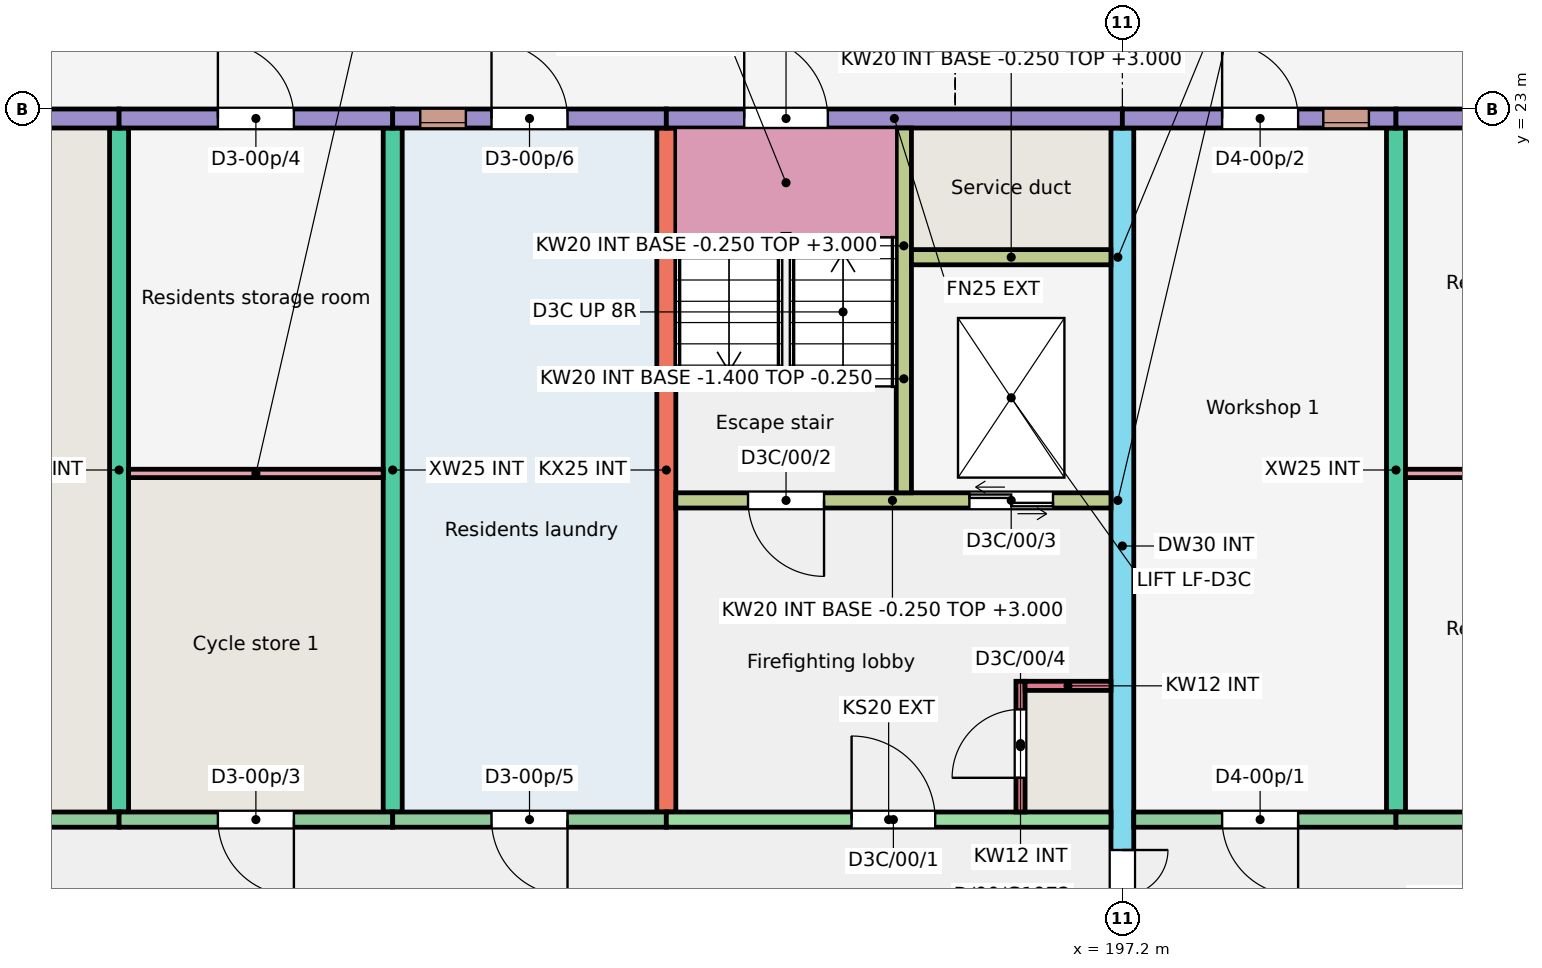
"""IFC4 building model, lengths in metres.
Left out: names, types, materials, properties, quantities, classifications, styles, units other than length and angle.
Written with IfcOpenShell. Run it as: python <this file> out.ifc"""

import sys

from ifc_helpers import new_model, si_unit, direction, frame, frame_2d, origin, place, context, subcontext, project, spatial, rectangle, extrude, element, fill, save


model = new_model("IFC4")
c1 = context("Model", 3, precision=1e-05, world=origin(), true_north=direction((0.0, 1.0)))
c2 = subcontext(c1, "Body", "Model", "MODEL_VIEW")
j1 = project(units=[si_unit("LENGTHUNIT", "METRE"), si_unit("PLANEANGLEUNIT", "RADIAN")], contexts=[c1])
p1 = place(None, origin())
s1 = spatial("IfcSite", under=j1, at=p1, CompositionType="ELEMENT")
p2 = place(p1, origin())
s2 = spatial("IfcBuilding", under=s1, at=p2, CompositionType="ELEMENT")
p3 = place(p2, origin())
s3 = spatial("IfcBuildingStorey", under=s2, at=p3, CompositionType="ELEMENT", Elevation=0.0)
for number, where, z_axis, x_axis in (
    (1, (184.0, 13.75, -0.25), (0.0, 0.0, 1.0), (0.0, 1.0, 0.0)),
    (2, (187.6, 13.75, -0.25), (0.0, 0.0, 1.0), (0.0, 1.0, 0.0)),
    (3, (191.2, 13.75, -0.25), (0.0, 0.0, 1.0), (0.0, 1.0, 0.0)),
):
    element("IfcWall", number, at=place(p3, frame(where, z_axis=z_axis, x_axis=x_axis)), inside=s3, PredefinedType="SHEAR", context=c2, shape_type="SweptSolid", body=[
        extrude(rectangle(XDim=9.0, YDim=0.25, at=frame_2d((4.5, 0.0))), origin(), (0.0, 0.0, 1.0), 3.25),
    ])
p4 = place(p3, frame((197.2, 11.75, -0.25), z_axis=(0.0, 0.0, 1.0), x_axis=(0.0, 1.0, 0.0)))
e4 = element("IfcWall", 4, at=p4, inside=s3, PredefinedType="SHEAR", context=c2, shape_type="SweptSolid", body=[
    extrude(rectangle(XDim=11.0, YDim=0.3, at=frame_2d((5.5, 0.0))), origin(), (0.0, 0.0, 1.0), 3.25),
])
p5 = place(p4, frame((0.3, 0.0, 0.25)))
e5 = element("IfcOpeningElement", 5, at=p5, cuts=e4, PredefinedType="OPENING", context=c2, shape_type="SweptSolid", body=[
    extrude(rectangle(XDim=1.2, YDim=2.1, at=frame_2d((0.6, 1.05))), frame((0.0, 0.16, 0.0), z_axis=(0.0, -1.0, 0.0), x_axis=(1.0, 0.0, 0.0)), (0.0, 0.0, 1.0), 0.32),
])
p6 = place(p3, frame((200.8, 13.75, -0.25), z_axis=(0.0, 0.0, 1.0), x_axis=(0.0, 1.0, 0.0)))
e6 = element("IfcWall", 6, at=p6, inside=s3, PredefinedType="SHEAR", context=c2, shape_type="SweptSolid", body=[
    extrude(rectangle(XDim=9.0, YDim=0.25, at=frame_2d((4.5, 0.0))), origin(), (0.0, 0.0, 1.0), 3.25),
])
p7 = place(p3, frame((180.4, 22.875, -0.25), z_axis=(0.0, 0.0, 1.0), x_axis=(1.0, 0.0, 0.0)))
e7 = element("IfcWall", 7, at=p7, inside=s3, PredefinedType="SOLIDWALL", context=c2, shape_type="SweptSolid", body=[
    extrude(rectangle(XDim=3.6, YDim=0.25, at=frame_2d((1.8, 0.0))), origin(), (0.0, 0.0, 1.0), 3.25),
])
p8 = place(p7, frame((1.312, 0.0, 0.25)))
e8 = element("IfcOpeningElement", 8, at=p8, cuts=e7, PredefinedType="OPENING", context=c2, shape_type="SweptSolid", body=[
    extrude(rectangle(XDim=1.0, YDim=2.1, at=frame_2d((0.5, 1.05))), frame((0.0, 0.135, 0.0), z_axis=(0.0, -1.0, 0.0), x_axis=(1.0, 0.0, 0.0)), (0.0, 0.0, 1.0), 0.27),
])
p9 = place(p3, frame((180.55, 13.65, -0.25), z_axis=(0.0, 0.0, 1.0), x_axis=(1.0, 0.0, 0.0)))
e9 = element("IfcWall", 9, at=p9, inside=s3, PredefinedType="SOLIDWALL", context=c2, shape_type="SweptSolid", body=[
    extrude(rectangle(XDim=3.45, YDim=0.2, at=frame_2d((1.725, 0.0))), origin(), (0.0, 0.0, 1.0), 3.25),
])
p10 = place(p9, frame((1.163, 0.0, 0.25)))
e10 = element("IfcOpeningElement", 10, at=p10, cuts=e9, PredefinedType="OPENING", context=c2, shape_type="SweptSolid", body=[
    extrude(rectangle(XDim=1.0, YDim=2.1, at=frame_2d((0.5, 1.05))), frame((0.0, 0.11, 0.0), z_axis=(0.0, -1.0, 0.0), x_axis=(1.0, 0.0, 0.0)), (0.0, 0.0, 1.0), 0.22),
])
p11 = place(p3, frame((184.0, 22.875, -0.25), z_axis=(0.0, 0.0, 1.0), x_axis=(1.0, 0.0, 0.0)))
e11 = element("IfcWall", 11, at=p11, inside=s3, PredefinedType="SOLIDWALL", context=c2, shape_type="SweptSolid", body=[
    extrude(rectangle(XDim=3.6, YDim=0.25, at=frame_2d((1.8, 0.0))), origin(), (0.0, 0.0, 1.0), 3.25),
])
p12 = place(p11, frame((1.3, 0.0, 0.25)))
e12 = element("IfcOpeningElement", 12, at=p12, cuts=e11, PredefinedType="OPENING", context=c2, shape_type="SweptSolid", body=[
    extrude(rectangle(XDim=1.0, YDim=2.1, at=frame_2d((0.5, 1.05))), frame((0.0, 0.135, 0.0), z_axis=(0.0, -1.0, 0.0), x_axis=(1.0, 0.0, 0.0)), (0.0, 0.0, 1.0), 0.27),
])
p13 = place(p3, frame((184.0, 13.65, -0.25), z_axis=(0.0, 0.0, 1.0), x_axis=(1.0, 0.0, 0.0)))
e13 = element("IfcWall", 13, at=p13, inside=s3, PredefinedType="SOLIDWALL", context=c2, shape_type="SweptSolid", body=[
    extrude(rectangle(XDim=3.6, YDim=0.2, at=frame_2d((1.8, 0.0))), origin(), (0.0, 0.0, 1.0), 3.25),
])
p14 = place(p13, frame((1.3, 0.0, 0.25)))
e14 = element("IfcOpeningElement", 14, at=p14, cuts=e13, PredefinedType="OPENING", context=c2, shape_type="SweptSolid", body=[
    extrude(rectangle(XDim=1.0, YDim=2.1, at=frame_2d((0.5, 1.05))), frame((0.0, 0.11, 0.0), z_axis=(0.0, -1.0, 0.0), x_axis=(1.0, 0.0, 0.0)), (0.0, 0.0, 1.0), 0.22),
])
p15 = place(p3, frame((187.6, 22.875, -0.25), z_axis=(0.0, 0.0, 1.0), x_axis=(1.0, 0.0, 0.0)))
e15 = element("IfcWall", 15, at=p15, inside=s3, PredefinedType="SOLIDWALL", context=c2, shape_type="SweptSolid", body=[
    extrude(rectangle(XDim=3.6, YDim=0.25, at=frame_2d((1.8, 0.0))), origin(), (0.0, 0.0, 1.0), 3.25),
])
p16 = place(p15, frame((0.363, 0.0, 2.05)))
e16 = element("IfcOpeningElement", 16, at=p16, cuts=e15, PredefinedType="OPENING", context=c2, shape_type="SweptSolid", body=[
    extrude(rectangle(XDim=0.6, YDim=0.6, at=frame_2d((0.3, 0.3))), frame((0.0, 0.135, 0.0), z_axis=(0.0, -1.0, 0.0), x_axis=(1.0, 0.0, 0.0)), (0.0, 0.0, 1.0), 0.27),
])
p17 = place(p15, frame((1.3, 0.0, 0.25)))
e17 = element("IfcOpeningElement", 17, at=p17, cuts=e15, PredefinedType="OPENING", context=c2, shape_type="SweptSolid", body=[
    extrude(rectangle(XDim=1.0, YDim=2.1, at=frame_2d((0.5, 1.05))), frame((0.0, 0.135, 0.0), z_axis=(0.0, -1.0, 0.0), x_axis=(1.0, 0.0, 0.0)), (0.0, 0.0, 1.0), 0.27),
])
p18 = place(p3, frame((187.6, 13.65, -0.25), z_axis=(0.0, 0.0, 1.0), x_axis=(1.0, 0.0, 0.0)))
e18 = element("IfcWall", 18, at=p18, inside=s3, PredefinedType="SOLIDWALL", context=c2, shape_type="SweptSolid", body=[
    extrude(rectangle(XDim=3.6, YDim=0.2, at=frame_2d((1.8, 0.0))), origin(), (0.0, 0.0, 1.0), 3.25),
])
p19 = place(p18, frame((1.3, 0.0, 0.25)))
e19 = element("IfcOpeningElement", 19, at=p19, cuts=e18, PredefinedType="OPENING", context=c2, shape_type="SweptSolid", body=[
    extrude(rectangle(XDim=1.0, YDim=2.1, at=frame_2d((0.5, 1.05))), frame((0.0, 0.11, 0.0), z_axis=(0.0, -1.0, 0.0), x_axis=(1.0, 0.0, 0.0)), (0.0, 0.0, 1.0), 0.22),
])
p20 = place(p3, frame((191.2, 22.875, -0.25), z_axis=(0.0, 0.0, 1.0), x_axis=(1.0, 0.0, 0.0)))
e20 = element("IfcWall", 20, at=p20, inside=s3, PredefinedType="SOLIDWALL", context=c2, shape_type="SweptSolid", body=[
    extrude(rectangle(XDim=6.0, YDim=0.25, at=frame_2d((3.0, 0.0))), origin(), (0.0, 0.0, 1.0), 3.25),
])
p21 = place(p20, frame((1.025, 0.0, 0.25)))
e21 = element("IfcOpeningElement", 21, at=p21, cuts=e20, PredefinedType="OPENING", context=c2, shape_type="SweptSolid", body=[
    extrude(rectangle(XDim=1.1, YDim=2.1, at=frame_2d((0.55, 1.05))), frame((0.0, 0.135, 0.0), z_axis=(0.0, -1.0, 0.0), x_axis=(1.0, 0.0, 0.0)), (0.0, 0.0, 1.0), 0.27),
])
p22 = place(p3, frame((191.2, 13.65, -0.25), z_axis=(0.0, 0.0, 1.0), x_axis=(1.0, 0.0, 0.0)))
e22 = element("IfcWall", 22, at=p22, inside=s3, PredefinedType="SHEAR", context=c2, shape_type="SweptSolid", body=[
    extrude(rectangle(XDim=5.85, YDim=0.2, at=frame_2d((2.925, 0.0))), origin(), (0.0, 0.0, 1.0), 3.25),
])
p23 = place(p22, frame((2.438, 0.0, 0.25)))
e23 = element("IfcOpeningElement", 23, at=p23, cuts=e22, PredefinedType="OPENING", context=c2, shape_type="SweptSolid", body=[
    extrude(rectangle(XDim=1.1, YDim=2.1, at=frame_2d((0.55, 1.05))), frame((0.0, 0.11, 0.0), z_axis=(0.0, -1.0, 0.0), x_axis=(1.0, 0.0, 0.0)), (0.0, 0.0, 1.0), 0.22),
])
p24 = place(p3, frame((191.325, 17.85, -0.25), z_axis=(0.0, 0.0, 1.0), x_axis=(1.0, 0.0, 0.0)))
e24 = element("IfcWall", 24, at=p24, inside=s3, PredefinedType="SHEAR", context=c2, shape_type="SweptSolid", body=[
    extrude(rectangle(XDim=5.725, YDim=0.2, at=frame_2d((2.863, 0.0))), origin(), (0.0, 0.0, 1.0), 3.25),
])
p25 = place(p24, frame((0.95, 0.0, 0.25)))
e25 = element("IfcOpeningElement", 25, at=p25, cuts=e24, PredefinedType="OPENING", context=c2, shape_type="SweptSolid", body=[
    extrude(rectangle(XDim=1.0, YDim=2.1, at=frame_2d((0.5, 1.05))), frame((0.0, 0.11, 0.0), z_axis=(0.0, -1.0, 0.0), x_axis=(1.0, 0.0, 0.0)), (0.0, 0.0, 1.0), 0.22),
])
p26 = place(p24, frame((3.863, 0.0, 0.25)))
e26 = element("IfcOpeningElement", 26, at=p26, cuts=e24, PredefinedType="OPENING", context=c2, shape_type="SweptSolid", body=[
    extrude(rectangle(XDim=1.1, YDim=2.1, at=frame_2d((0.55, 1.05))), frame((0.0, 0.11, 0.0), z_axis=(0.0, -1.0, 0.0), x_axis=(1.0, 0.0, 0.0)), (0.0, 0.0, 1.0), 0.22),
])
p27 = place(p3, frame((194.325, 17.95, -0.25), z_axis=(0.0, 0.0, 1.0), x_axis=(0.0, 1.0, 0.0)))
e27 = element("IfcWall", 27, at=p27, inside=s3, PredefinedType="SHEAR", context=c2, shape_type="SweptSolid", body=[
    extrude(rectangle(XDim=4.8, YDim=0.2, at=frame_2d((2.4, 0.0))), origin(), (0.0, 0.0, 1.0), 3.25),
])
p28 = place(p3, frame((194.425, 21.05, -0.25), z_axis=(0.0, 0.0, 1.0), x_axis=(1.0, 0.0, 0.0)))
e28 = element("IfcWall", 28, at=p28, inside=s3, PredefinedType="SHEAR", context=c2, shape_type="SweptSolid", body=[
    extrude(rectangle(XDim=2.625, YDim=0.2, at=frame_2d((1.312, 0.0))), origin(), (0.0, 0.0, 1.0), 3.25),
])
p29 = place(p3, frame((195.86, 13.75, -0.25), z_axis=(0.0, 0.0, 1.0), x_axis=(0.0, 1.0, 0.0)))
e29 = element("IfcWall", 29, at=p29, inside=s3, PredefinedType="SHEAR", context=c2, shape_type="SweptSolid", body=[
    extrude(rectangle(XDim=1.72, YDim=0.12, at=frame_2d((0.86, 0.0))), origin(), (0.0, 0.0, 1.0), 3.25),
])
p30 = place(p29, frame((0.45, 0.0, 0.25)))
e30 = element("IfcOpeningElement", 30, at=p30, cuts=e29, PredefinedType="OPENING", context=c2, shape_type="SweptSolid", body=[
    extrude(rectangle(XDim=0.9, YDim=2.1, at=frame_2d((0.45, 1.05))), frame((0.0, 0.07, 0.0), z_axis=(0.0, -1.0, 0.0), x_axis=(1.0, 0.0, 0.0)), (0.0, 0.0, 1.0), 0.14),
])
p31 = place(p3, frame((195.92, 15.41, -0.25), z_axis=(0.0, 0.0, 1.0), x_axis=(1.0, 0.0, 0.0)))
e31 = element("IfcWall", 31, at=p31, inside=s3, PredefinedType="SHEAR", context=c2, shape_type="SweptSolid", body=[
    extrude(rectangle(XDim=1.13, YDim=0.12, at=frame_2d((0.565, 0.0))), origin(), (0.0, 0.0, 1.0), 3.25),
])
p32 = place(p3, frame((197.2, 22.875, -0.25), z_axis=(0.0, 0.0, 1.0), x_axis=(1.0, 0.0, 0.0)))
e32 = element("IfcWall", 32, at=p32, inside=s3, PredefinedType="SOLIDWALL", context=c2, shape_type="SweptSolid", body=[
    extrude(rectangle(XDim=3.6, YDim=0.25, at=frame_2d((1.8, 0.0))), origin(), (0.0, 0.0, 1.0), 3.25),
])
p33 = place(p32, frame((2.644, 0.0, 2.05)))
e33 = element("IfcOpeningElement", 33, at=p33, cuts=e32, PredefinedType="OPENING", context=c2, shape_type="SweptSolid", body=[
    extrude(rectangle(XDim=0.6, YDim=0.6, at=frame_2d((0.3, 0.3))), frame((0.0, 0.135, 0.0), z_axis=(0.0, -1.0, 0.0), x_axis=(1.0, 0.0, 0.0)), (0.0, 0.0, 1.0), 0.27),
])
p34 = place(p32, frame((1.312, 0.0, 0.25)))
e34 = element("IfcOpeningElement", 34, at=p34, cuts=e32, PredefinedType="OPENING", context=c2, shape_type="SweptSolid", body=[
    extrude(rectangle(XDim=1.0, YDim=2.1, at=frame_2d((0.5, 1.05))), frame((0.0, 0.135, 0.0), z_axis=(0.0, -1.0, 0.0), x_axis=(1.0, 0.0, 0.0)), (0.0, 0.0, 1.0), 0.27),
])
p35 = place(p3, frame((197.35, 13.65, -0.25), z_axis=(0.0, 0.0, 1.0), x_axis=(1.0, 0.0, 0.0)))
e35 = element("IfcWall", 35, at=p35, inside=s3, PredefinedType="SOLIDWALL", context=c2, shape_type="SweptSolid", body=[
    extrude(rectangle(XDim=3.45, YDim=0.2, at=frame_2d((1.725, 0.0))), origin(), (0.0, 0.0, 1.0), 3.25),
])
p36 = place(p35, frame((1.163, 0.0, 0.25)))
e36 = element("IfcOpeningElement", 36, at=p36, cuts=e35, PredefinedType="OPENING", context=c2, shape_type="SweptSolid", body=[
    extrude(rectangle(XDim=1.0, YDim=2.1, at=frame_2d((0.5, 1.05))), frame((0.0, 0.11, 0.0), z_axis=(0.0, -1.0, 0.0), x_axis=(1.0, 0.0, 0.0)), (0.0, 0.0, 1.0), 0.22),
])
p37 = place(p3, frame((200.8, 22.875, -0.25), z_axis=(0.0, 0.0, 1.0), x_axis=(1.0, 0.0, 0.0)))
e37 = element("IfcWall", 37, at=p37, inside=s3, PredefinedType="SOLIDWALL", context=c2, shape_type="SweptSolid", body=[
    extrude(rectangle(XDim=3.6, YDim=0.25, at=frame_2d((1.8, 0.0))), origin(), (0.0, 0.0, 1.0), 3.25),
])
p38 = place(p37, frame((1.3, 0.0, 0.25)))
e38 = element("IfcOpeningElement", 38, at=p38, cuts=e37, PredefinedType="OPENING", context=c2, shape_type="SweptSolid", body=[
    extrude(rectangle(XDim=1.0, YDim=2.1, at=frame_2d((0.5, 1.05))), frame((0.0, 0.135, 0.0), z_axis=(0.0, -1.0, 0.0), x_axis=(1.0, 0.0, 0.0)), (0.0, 0.0, 1.0), 0.27),
])
p39 = place(p3, frame((200.8, 13.65, -0.25), z_axis=(0.0, 0.0, 1.0), x_axis=(1.0, 0.0, 0.0)))
e39 = element("IfcWall", 39, at=p39, inside=s3, PredefinedType="SOLIDWALL", context=c2, shape_type="SweptSolid", body=[
    extrude(rectangle(XDim=3.6, YDim=0.2, at=frame_2d((1.8, 0.0))), origin(), (0.0, 0.0, 1.0), 3.25),
])
p40 = place(p39, frame((1.3, 0.0, 0.25)))
e40 = element("IfcOpeningElement", 40, at=p40, cuts=e39, PredefinedType="OPENING", context=c2, shape_type="SweptSolid", body=[
    extrude(rectangle(XDim=1.0, YDim=2.1, at=frame_2d((0.5, 1.05))), frame((0.0, 0.11, 0.0), z_axis=(0.0, -1.0, 0.0), x_axis=(1.0, 0.0, 0.0)), (0.0, 0.0, 1.0), 0.22),
])
for number, where, z_axis, x_axis in (
    (41, (194.225, 17.85, -1.4), (0.0, 0.0, 1.0), (1.0, 0.0, 0.0)),
    (42, (194.225, 21.05, -1.4), (0.0, 0.0, 1.0), (1.0, 0.0, 0.0)),
):
    element("IfcWall", number, at=place(p3, frame(where, z_axis=z_axis, x_axis=x_axis)), inside=s3, PredefinedType="SHEAR", context=c2, shape_type="SweptSolid", body=[
        extrude(rectangle(XDim=2.975, YDim=0.2, at=frame_2d((1.487, 0.0))), origin(), (0.0, 0.0, 1.0), 1.15),
    ])
p41 = place(p3, frame((194.325, 17.95, -1.4), z_axis=(0.0, 0.0, 1.0), x_axis=(0.0, 1.0, 0.0)))
e43 = element("IfcWall", 43, at=p41, inside=s3, PredefinedType="SHEAR", context=c2, shape_type="SweptSolid", body=[
    extrude(rectangle(XDim=3.0, YDim=0.2, at=frame_2d((1.5, 0.0))), origin(), (0.0, 0.0, 1.0), 1.15),
])
p42 = place(p3, frame((197.125, 17.95, -1.4), z_axis=(0.0, 0.0, 1.0), x_axis=(0.0, 1.0, 0.0)))
e44 = element("IfcWall", 44, at=p42, inside=s3, PredefinedType="SHEAR", context=c2, shape_type="SweptSolid", body=[
    extrude(rectangle(XDim=3.0, YDim=0.15, at=frame_2d((1.5, 0.0))), origin(), (0.0, 0.0, 1.0), 1.15),
])
p43 = place(p3, frame((184.125, 18.205, 0.0), z_axis=(0.0, 0.0, 1.0), x_axis=(1.0, 0.0, 0.0)))
e45 = element("IfcWall", 45, at=p43, inside=s3, PredefinedType="PARTITIONING", context=c2, shape_type="SweptSolid", body=[
    extrude(rectangle(XDim=3.35, YDim=0.11, at=frame_2d((1.675, 0.0))), origin(), (0.0, 0.0, 1.0), 2.8),
])
p44 = place(p3, frame((200.925, 18.205, 0.0), z_axis=(0.0, 0.0, 1.0), x_axis=(1.0, 0.0, 0.0)))
e46 = element("IfcWall", 46, at=p44, inside=s3, PredefinedType="PARTITIONING", context=c2, shape_type="SweptSolid", body=[
    extrude(rectangle(XDim=3.35, YDim=0.11, at=frame_2d((1.675, 0.0))), origin(), (0.0, 0.0, 1.0), 2.8),
])
p45 = place(p16, origin())
e47 = element("IfcWindow", 47, at=p45, inside=s3, PartitioningType="SINGLE_PANEL", PredefinedType="WINDOW", context=c2, shape_type="SweptSolid", body=[
    extrude(rectangle(XDim=0.6, YDim=0.6, at=frame_2d((0.3, 0.3))), frame((0.0, -0.025, 0.0), z_axis=(0.0, -1.0, 0.0), x_axis=(1.0, 0.0, 0.0)), (0.0, 0.0, 1.0), 0.06),
])
fill(e16, e47)
p46 = place(p33, origin())
e48 = element("IfcWindow", 48, at=p46, inside=s3, PartitioningType="SINGLE_PANEL", PredefinedType="WINDOW", context=c2, shape_type="SweptSolid", body=[
    extrude(rectangle(XDim=0.6, YDim=0.6, at=frame_2d((0.3, 0.3))), frame((0.0, -0.025, 0.0), z_axis=(0.0, -1.0, 0.0), x_axis=(1.0, 0.0, 0.0)), (0.0, 0.0, 1.0), 0.06),
])
fill(e33, e48)
p47 = place(p14, origin())
e49 = element("IfcDoor", 49, at=p47, inside=s3, OperationType="SINGLE_SWING_RIGHT", PredefinedType="DOOR", context=c2, shape_type="SweptSolid", body=[
    extrude(rectangle(XDim=1.0, YDim=2.1, at=frame_2d((0.5, 1.05))), frame((0.0, 0.025, 0.0), z_axis=(0.0, -1.0, 0.0), x_axis=(1.0, 0.0, 0.0)), (0.0, 0.0, 1.0), 0.05),
])
fill(e14, e49)
p48 = place(p12, origin())
e50 = element("IfcDoor", 50, at=p48, inside=s3, OperationType="SINGLE_SWING_LEFT", PredefinedType="DOOR", context=c2, shape_type="SweptSolid", body=[
    extrude(rectangle(XDim=1.0, YDim=2.1, at=frame_2d((0.5, 1.05))), frame((0.0, 0.025, 0.0), z_axis=(0.0, -1.0, 0.0), x_axis=(1.0, 0.0, 0.0)), (0.0, 0.0, 1.0), 0.05),
])
fill(e12, e50)
p49 = place(p19, origin())
e51 = element("IfcDoor", 51, at=p49, inside=s3, OperationType="SINGLE_SWING_RIGHT", PredefinedType="DOOR", context=c2, shape_type="SweptSolid", body=[
    extrude(rectangle(XDim=1.0, YDim=2.1, at=frame_2d((0.5, 1.05))), frame((0.0, 0.025, 0.0), z_axis=(0.0, -1.0, 0.0), x_axis=(1.0, 0.0, 0.0)), (0.0, 0.0, 1.0), 0.05),
])
fill(e19, e51)
p50 = place(p17, origin())
e52 = element("IfcDoor", 52, at=p50, inside=s3, OperationType="SINGLE_SWING_LEFT", PredefinedType="DOOR", context=c2, shape_type="SweptSolid", body=[
    extrude(rectangle(XDim=1.0, YDim=2.1, at=frame_2d((0.5, 1.05))), frame((0.0, 0.025, 0.0), z_axis=(0.0, -1.0, 0.0), x_axis=(1.0, 0.0, 0.0)), (0.0, 0.0, 1.0), 0.05),
])
fill(e17, e52)
p51 = place(p36, origin())
e53 = element("IfcDoor", 53, at=p51, inside=s3, OperationType="SINGLE_SWING_RIGHT", PredefinedType="DOOR", context=c2, shape_type="SweptSolid", body=[
    extrude(rectangle(XDim=1.0, YDim=2.1, at=frame_2d((0.5, 1.05))), frame((0.0, 0.025, 0.0), z_axis=(0.0, -1.0, 0.0), x_axis=(1.0, 0.0, 0.0)), (0.0, 0.0, 1.0), 0.05),
])
fill(e36, e53)
p52 = place(p34, origin())
e54 = element("IfcDoor", 54, at=p52, inside=s3, OperationType="SINGLE_SWING_LEFT", PredefinedType="DOOR", context=c2, shape_type="SweptSolid", body=[
    extrude(rectangle(XDim=1.0, YDim=2.1, at=frame_2d((0.5, 1.05))), frame((0.0, 0.025, 0.0), z_axis=(0.0, -1.0, 0.0), x_axis=(1.0, 0.0, 0.0)), (0.0, 0.0, 1.0), 0.05),
])
fill(e34, e54)
p53 = place(p23, origin())
e55 = element("IfcDoor", 55, at=p53, inside=s3, OperationType="SINGLE_SWING_LEFT", PredefinedType="DOOR", context=c2, shape_type="SweptSolid", body=[
    extrude(rectangle(XDim=1.1, YDim=2.1, at=frame_2d((0.55, 1.05))), frame((0.0, 0.025, 0.0), z_axis=(0.0, -1.0, 0.0), x_axis=(1.0, 0.0, 0.0)), (0.0, 0.0, 1.0), 0.05),
])
fill(e23, e55)
p54 = place(p25, origin())
e56 = element("IfcDoor", 56, at=p54, inside=s3, OperationType="SINGLE_SWING_RIGHT", PredefinedType="DOOR", context=c2, shape_type="SweptSolid", body=[
    extrude(rectangle(XDim=1.0, YDim=2.1, at=frame_2d((0.5, 1.05))), frame((0.0, 0.025, 0.0), z_axis=(0.0, -1.0, 0.0), x_axis=(1.0, 0.0, 0.0)), (0.0, 0.0, 1.0), 0.05),
])
fill(e25, e56)
p55 = place(p26, origin())
e57 = element("IfcDoor", 57, at=p55, inside=s3, OperationType="DOUBLE_DOOR_SLIDING", PredefinedType="DOOR", context=c2, shape_type="SweptSolid", body=[
    extrude(rectangle(XDim=1.1, YDim=2.1, at=frame_2d((0.55, 1.05))), frame((0.0, 0.025, 0.0), z_axis=(0.0, -1.0, 0.0), x_axis=(1.0, 0.0, 0.0)), (0.0, 0.0, 1.0), 0.05),
])
fill(e26, e57)
p56 = place(p30, origin())
e58 = element("IfcDoor", 58, at=p56, inside=s3, OperationType="SINGLE_SWING_LEFT", PredefinedType="DOOR", context=c2, shape_type="SweptSolid", body=[
    extrude(rectangle(XDim=0.9, YDim=2.1, at=frame_2d((0.45, 1.05))), frame((0.0, 0.025, 0.0), z_axis=(0.0, -1.0, 0.0), x_axis=(1.0, 0.0, 0.0)), (0.0, 0.0, 1.0), 0.05),
])
fill(e30, e58)
p57 = place(p21, origin())
e59 = element("IfcDoor", 59, at=p57, inside=s3, OperationType="SINGLE_SWING_LEFT", PredefinedType="DOOR", context=c2, shape_type="SweptSolid", body=[
    extrude(rectangle(XDim=1.1, YDim=2.1, at=frame_2d((0.55, 1.05))), frame((0.0, 0.025, 0.0), z_axis=(0.0, -1.0, 0.0), x_axis=(1.0, 0.0, 0.0)), (0.0, 0.0, 1.0), 0.05),
])
fill(e21, e59)
p58 = place(p5, origin())
e60 = element("IfcDoor", 60, at=p58, inside=s3, OperationType="DOUBLE_DOOR_SINGLE_SWING", PredefinedType="DOOR", context=c2, shape_type="SweptSolid", body=[
    extrude(rectangle(XDim=1.2, YDim=2.1, at=frame_2d((0.6, 1.05))), frame((0.0, 0.025, 0.0), z_axis=(0.0, -1.0, 0.0), x_axis=(1.0, 0.0, 0.0)), (0.0, 0.0, 1.0), 0.05),
])
fill(e5, e60)
save(model, sys.argv[1])
